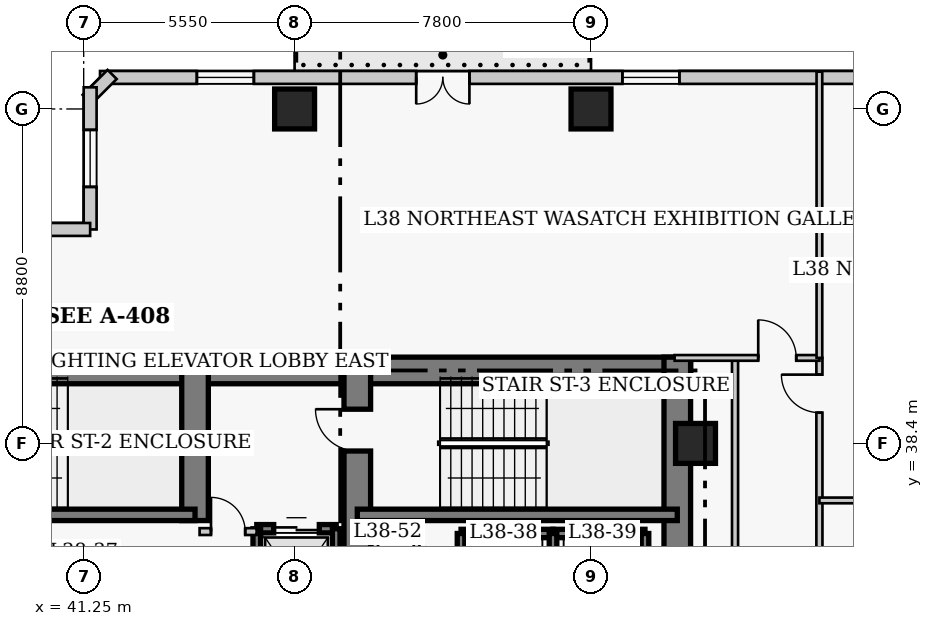
"""IFC4 building model, lengths in metres.
Left out: names, types, materials, properties, quantities, classifications, styles, units other than length and angle.
Written with IfcOpenShell. Run it as: python <this file> out.ifc"""

import sys

from ifc_helpers import new_model, si_unit, direction, frame, frame_2d, origin, origin_2d, place, context, subcontext, project, spatial, rectangle, extrude, element, fill, save


model = new_model("IFC4")
c1 = context("Model", 3, precision=1e-05, world=origin(), true_north=direction((0.0, 1.0)))
c2 = subcontext(c1, "Body", "Model", "MODEL_VIEW")
j1 = project(units=[si_unit("LENGTHUNIT", "METRE"), si_unit("PLANEANGLEUNIT", "RADIAN")], contexts=[c1])
p1 = place(None, origin())
s1 = spatial("IfcSite", under=j1, at=p1, CompositionType="ELEMENT")
p2 = place(p1, origin())
s2 = spatial("IfcBuilding", under=s1, at=p2, CompositionType="ELEMENT")
p3 = place(p2, frame((0.0, 0.0, 153.6)))
s3 = spatial("IfcBuildingStorey", under=s2, at=p3, CompositionType="ELEMENT", Elevation=153.6)
p4 = place(p3, frame((35.85, 40.32, 0.0), z_axis=(0.0, 0.0, 1.0), x_axis=(1.0, 0.0, 0.0)))
e1 = element("IfcWall", 1, at=p4, inside=s3, PredefinedType="SHEAR", context=c2, shape_type="SweptSolid", body=[
    extrude(rectangle(XDim=12.6, YDim=0.7, at=frame_2d((6.3, 0.0))), origin(), (0.0, 0.0, 1.0), 3.8),
])
p5 = place(p3, frame((48.45, 40.32, 0.0), z_axis=(0.0, 0.0, 1.0), x_axis=(1.0, 0.0, 0.0)))
e2 = element("IfcWall", 2, at=p5, inside=s3, PredefinedType="SHEAR", context=c2, shape_type="SweptSolid", body=[
    extrude(rectangle(XDim=8.77, YDim=0.7, at=frame_2d((4.385, 0.0))), origin(), (0.0, 0.0, 1.0), 3.8),
])
p6 = place(p3, frame((56.87, 27.05, 0.0), z_axis=(0.0, 0.0, 1.0), x_axis=(0.0, 1.0, 0.0)))
e3 = element("IfcWall", 3, at=p6, inside=s3, PredefinedType="SHEAR", context=c2, shape_type="SweptSolid", body=[
    extrude(rectangle(XDim=13.62, YDim=0.7, at=frame_2d((6.81, 0.0))), origin(), (0.0, 0.0, 1.0), 3.8),
])
p7 = place(p3, frame((44.18, 36.37, 0.0), z_axis=(0.0, 0.0, 1.0), x_axis=(0.0, 1.0, 0.0)))
e4 = element("IfcWall", 4, at=p7, inside=s3, PredefinedType="SHEAR", context=c2, shape_type="SweptSolid", body=[
    extrude(rectangle(XDim=3.95, YDim=0.7, at=frame_2d((1.975, 0.0))), origin(), (0.0, 0.0, 1.0), 3.8),
])
p8 = place(p3, frame((48.45, 32.4, 0.0), z_axis=(0.0, 0.0, 1.0), x_axis=(0.0, 1.0, 0.0)))
e5 = element("IfcWall", 5, at=p8, inside=s3, PredefinedType="SHEAR", context=c2, shape_type="SweptSolid", body=[
    extrude(rectangle(XDim=7.92, YDim=0.7, at=frame_2d((3.96, 0.0))), origin(), (0.0, 0.0, 1.0), 3.8),
])
p9 = place(p8, frame((5.8, 0.0, 0.0)))
e6 = element("IfcOpeningElement", 6, at=p9, cuts=e5, PredefinedType="OPENING", context=c2, shape_type="SweptSolid", body=[
    extrude(rectangle(XDim=1.1, YDim=2.15, at=frame_2d((0.55, 1.075))), frame((0.0, 0.36, 0.0), z_axis=(0.0, -1.0, 0.0), x_axis=(1.0, 0.0, 0.0)), (0.0, 0.0, 1.0), 0.72),
])
p10 = place(p3, frame((35.85, 36.52, 0.0), z_axis=(0.0, 0.0, 1.0), x_axis=(1.0, 0.0, 0.0)))
e7 = element("IfcWall", 7, at=p10, inside=s3, PredefinedType="SHEAR", context=c2, shape_type="SweptSolid", body=[
    extrude(rectangle(XDim=8.33, YDim=0.3, at=frame_2d((4.165, 0.0))), origin(), (0.0, 0.0, 1.0), 3.8),
])
p11 = place(p3, frame((48.45, 36.52, 0.0), z_axis=(0.0, 0.0, 1.0), x_axis=(1.0, 0.0, 0.0)))
e8 = element("IfcWall", 8, at=p11, inside=s3, PredefinedType="SHEAR", context=c2, shape_type="SweptSolid", body=[
    extrude(rectangle(XDim=8.42, YDim=0.3, at=frame_2d((4.21, 0.0))), origin(), (0.0, 0.0, 1.0), 3.8),
])
for number, where, z_axis, x_axis in (
    (9, (46.8, 47.2, 0.0), (0.0, 0.0, 1.0), (1.0, 0.0, 0.0)),
    (10, (54.6, 47.2, 0.0), (0.0, 0.0, 1.0), (1.0, 0.0, 0.0)),
    (11, (57.35, 38.4, 0.0), (0.0, 0.0, 1.0), (1.0, 0.0, 0.0)),
):
    element("IfcColumn", number, at=place(p3, frame(where, z_axis=z_axis, x_axis=x_axis)), inside=s3, PredefinedType="COLUMN", context=c2, shape_type="SweptSolid", body=[
        extrude(rectangle(XDim=1.05, YDim=1.05, at=origin_2d()), origin(), (0.0, 0.0, 1.0), 3.8),
    ])
p12 = place(p3, frame((68.37, 48.03, 0.0), z_axis=(0.0, 0.0, 1.0), x_axis=(-1.0, 0.0, 0.0)))
e12 = element("IfcWall", 12, at=p12, inside=s3, PredefinedType="SOLIDWALL", context=c2, shape_type="SweptSolid", body=[
    extrude(rectangle(XDim=26.69, YDim=0.34, at=frame_2d((13.345, 0.0))), origin(), (0.0, 0.0, 1.0), 3.55),
])
p13 = place(p12, frame((16.97, 0.0, 0.0)))
e13 = element("IfcOpeningElement", 13, at=p13, cuts=e12, PredefinedType="OPENING", context=c2, shape_type="SweptSolid", body=[
    extrude(rectangle(XDim=1.4, YDim=2.15, at=frame_2d((0.7, 1.075))), frame((0.0, 0.18, 0.0), z_axis=(0.0, -1.0, 0.0), x_axis=(1.0, 0.0, 0.0)), (0.0, 0.0, 1.0), 0.36),
])
p14 = place(p12, frame((3.048, 0.0, 0.85)))
e14 = element("IfcOpeningElement", 14, at=p14, cuts=e12, PredefinedType="OPENING", context=c2, shape_type="SweptSolid", body=[
    extrude(rectangle(XDim=1.5, YDim=1.75, at=frame_2d((0.75, 0.875))), frame((0.0, 0.18, 0.0), z_axis=(0.0, -1.0, 0.0), x_axis=(1.0, 0.0, 0.0)), (0.0, 0.0, 1.0), 0.36),
])
p15 = place(p12, frame((11.445, 0.0, 0.85)))
e15 = element("IfcOpeningElement", 15, at=p15, cuts=e12, PredefinedType="OPENING", context=c2, shape_type="SweptSolid", body=[
    extrude(rectangle(XDim=1.5, YDim=1.75, at=frame_2d((0.75, 0.875))), frame((0.0, 0.18, 0.0), z_axis=(0.0, -1.0, 0.0), x_axis=(1.0, 0.0, 0.0)), (0.0, 0.0, 1.0), 0.36),
])
p16 = place(p12, frame((22.642, 0.0, 0.85)))
e16 = element("IfcOpeningElement", 16, at=p16, cuts=e12, PredefinedType="OPENING", context=c2, shape_type="SweptSolid", body=[
    extrude(rectangle(XDim=1.5, YDim=1.75, at=frame_2d((0.75, 0.875))), frame((0.0, 0.18, 0.0), z_axis=(0.0, -1.0, 0.0), x_axis=(1.0, 0.0, 0.0)), (0.0, 0.0, 1.0), 0.36),
])
p17 = place(p3, frame((41.999, 48.108, 0.0), z_axis=(0.0, 0.0, 1.0), x_axis=(-0.707106781187, -0.707106781187, 0.0)))
e17 = element("IfcWall", 17, at=p17, inside=s3, PredefinedType="SOLIDWALL", context=c2, shape_type="SweptSolid", body=[
    extrude(rectangle(XDim=0.929, YDim=0.34, at=frame_2d((0.464, 0.0))), origin(), (0.0, 0.0, 1.0), 3.55),
])
p18 = place(p3, frame((41.42, 47.77, 0.0), z_axis=(0.0, 0.0, 1.0), x_axis=(0.0, -1.0, 0.0)))
e18 = element("IfcWall", 18, at=p18, inside=s3, PredefinedType="SOLIDWALL", context=c2, shape_type="SweptSolid", body=[
    extrude(rectangle(XDim=3.74, YDim=0.34, at=frame_2d((1.87, 0.0))), origin(), (0.0, 0.0, 1.0), 3.55),
])
p19 = place(p18, frame((1.12, 0.0, 0.85)))
e19 = element("IfcOpeningElement", 19, at=p19, cuts=e18, PredefinedType="OPENING", context=c2, shape_type="SweptSolid", body=[
    extrude(rectangle(XDim=1.5, YDim=1.75, at=frame_2d((0.75, 0.875))), frame((0.0, 0.18, 0.0), z_axis=(0.0, -1.0, 0.0), x_axis=(1.0, 0.0, 0.0)), (0.0, 0.0, 1.0), 0.36),
])
p20 = place(p3, frame((41.42, 44.03, 0.0), z_axis=(0.0, 0.0, 1.0), x_axis=(-1.0, 0.0, 0.0)))
e20 = element("IfcWall", 20, at=p20, inside=s3, PredefinedType="SOLIDWALL", context=c2, shape_type="SweptSolid", body=[
    extrude(rectangle(XDim=4.84, YDim=0.34, at=frame_2d((2.42, 0.0))), origin(), (0.0, 0.0, 1.0), 3.55),
])
p21 = place(p20, frame((1.67, 0.0, 0.85)))
e21 = element("IfcOpeningElement", 21, at=p21, cuts=e20, PredefinedType="OPENING", context=c2, shape_type="SweptSolid", body=[
    extrude(rectangle(XDim=1.5, YDim=1.75, at=frame_2d((0.75, 0.875))), frame((0.0, 0.18, 0.0), z_axis=(0.0, -1.0, 0.0), x_axis=(1.0, 0.0, 0.0)), (0.0, 0.0, 1.0), 0.36),
])
p22 = place(p3, frame((51.18, 36.03, 0.0), z_axis=(0.0, 0.0, 1.0), x_axis=(1.0, 0.0, 0.0)))
e22 = element("IfcWall", 22, at=p22, inside=s3, PredefinedType="SHEAR", context=c2, shape_type="SweptSolid", body=[
    extrude(rectangle(XDim=2.42, YDim=0.22, at=frame_2d((1.21, 0.0))), origin(), (0.0, 0.0, 1.0), 3.8),
])
p23 = place(p3, frame((51.18, 33.17, 0.0), z_axis=(0.0, 0.0, 1.0), x_axis=(0.0, 1.0, 0.0)))
e23 = element("IfcWall", 23, at=p23, inside=s3, PredefinedType="SHEAR", context=c2, shape_type="SweptSolid", body=[
    extrude(rectangle(XDim=2.86, YDim=0.2, at=frame_2d((1.43, 0.0))), origin(), (0.0, 0.0, 1.0), 3.8),
])
p24 = place(p3, frame((53.6, 36.03, 0.0), z_axis=(0.0, 0.0, 1.0), x_axis=(1.0, 0.0, 0.0)))
e24 = element("IfcWall", 24, at=p24, inside=s3, PredefinedType="SHEAR", context=c2, shape_type="SweptSolid", body=[
    extrude(rectangle(XDim=2.42, YDim=0.22, at=frame_2d((1.21, 0.0))), origin(), (0.0, 0.0, 1.0), 3.8),
])
for number, where, z_axis, x_axis in (
    (25, (53.6, 33.17, 0.0), (0.0, 0.0, 1.0), (0.0, 1.0, 0.0)),
    (26, (56.02, 33.17, 0.0), (0.0, 0.0, 1.0), (0.0, 1.0, 0.0)),
):
    element("IfcWall", number, at=place(p3, frame(where, z_axis=z_axis, x_axis=x_axis)), inside=s3, PredefinedType="SHEAR", context=c2, shape_type="SweptSolid", body=[
        extrude(rectangle(XDim=2.86, YDim=0.2, at=frame_2d((1.43, 0.0))), origin(), (0.0, 0.0, 1.0), 3.8),
    ])
p25 = place(p3, frame((45.805, 36.155, 0.0), z_axis=(0.0, 0.0, 1.0), x_axis=(1.0, 0.0, 0.0)))
e27 = element("IfcWall", 27, at=p25, inside=s3, PredefinedType="SHEAR", context=c2, shape_type="SweptSolid", body=[
    extrude(rectangle(XDim=2.09, YDim=0.22, at=frame_2d((1.045, 0.0))), origin(), (0.0, 0.0, 1.0), 3.8),
])
p26 = place(p25, frame((0.445, 0.0, 0.0)))
e28 = element("IfcOpeningElement", 28, at=p26, cuts=e27, PredefinedType="OPENING", context=c2, shape_type="SweptSolid", body=[
    extrude(rectangle(XDim=1.2, YDim=2.15, at=frame_2d((0.6, 1.075))), frame((0.0, 0.12, 0.0), z_axis=(0.0, -1.0, 0.0), x_axis=(1.0, 0.0, 0.0)), (0.0, 0.0, 1.0), 0.24),
])
p27 = place(p3, frame((45.805, 32.65, 0.0), z_axis=(0.0, 0.0, 1.0), x_axis=(0.0, 1.0, 0.0)))
e29 = element("IfcWall", 29, at=p27, inside=s3, PredefinedType="SHEAR", context=c2, shape_type="SweptSolid", body=[
    extrude(rectangle(XDim=3.505, YDim=0.2, at=frame_2d((1.752, 0.0))), origin(), (0.0, 0.0, 1.0), 3.8),
])
p28 = place(p3, frame((47.895, 33.245, 0.0), z_axis=(0.0, 0.0, 1.0), x_axis=(0.0, 1.0, 0.0)))
e30 = element("IfcWall", 30, at=p28, inside=s3, PredefinedType="SHEAR", context=c2, shape_type="SweptSolid", body=[
    extrude(rectangle(XDim=2.91, YDim=0.2, at=frame_2d((1.455, 0.0))), origin(), (0.0, 0.0, 1.0), 3.8),
])
p29 = place(p3, frame((44.3, 36.08, 0.0), z_axis=(0.0, 0.0, 1.0), x_axis=(1.0, 0.0, 0.0)))
e31 = element("IfcWall", 31, at=p29, inside=s3, PredefinedType="PARTITIONING", context=c2, shape_type="SweptSolid", body=[
    extrude(rectangle(XDim=1.5, YDim=0.18, at=frame_2d((0.75, 0.0))), origin(), (0.0, 0.0, 1.0), 3.55),
])
p30 = place(p29, frame((0.3, 0.0, 0.0)))
e32 = element("IfcOpeningElement", 32, at=p30, cuts=e31, PredefinedType="OPENING", context=c2, shape_type="SweptSolid", body=[
    extrude(rectangle(XDim=0.9, YDim=2.15, at=frame_2d((0.45, 1.075))), frame((0.0, 0.1, 0.0), z_axis=(0.0, -1.0, 0.0), x_axis=(1.0, 0.0, 0.0)), (0.0, 0.0, 1.0), 0.2),
])
for number, where, z_axis, x_axis in (
    (33, (48.92, 32.75, 0.0), (0.0, 0.0, 1.0), (0.0, 1.0, 0.0)),
    (34, (50.01, 32.75, 0.0), (0.0, 0.0, 1.0), (0.0, 1.0, 0.0)),
):
    element("IfcWall", number, at=place(p3, frame(where, z_axis=z_axis, x_axis=x_axis)), inside=s3, PredefinedType="PARTITIONING", context=c2, shape_type="SweptSolid", body=[
        extrude(rectangle(XDim=3.62, YDim=0.15, at=frame_2d((1.81, 0.0))), origin(), (0.0, 0.0, 1.0), 3.55),
    ])
p31 = place(p3, frame((60.61, 12.05, 0.0), z_axis=(0.0, 0.0, 1.0), x_axis=(0.0, 1.0, 0.0)))
e35 = element("IfcWall", 35, at=p31, inside=s3, PredefinedType="PARTITIONING", context=c2, shape_type="SweptSolid", body=[
    extrude(rectangle(XDim=28.6, YDim=0.16, at=frame_2d((14.3, 0.0))), origin(), (0.0, 0.0, 1.0), 3.55),
])
p32 = place(p31, frame((3.5, 0.0, 0.0)))
e36 = element("IfcOpeningElement", 36, at=p32, cuts=e35, PredefinedType="OPENING", context=c2, shape_type="SweptSolid", body=[
    extrude(rectangle(XDim=0.95, YDim=2.1, at=frame_2d((0.475, 1.05))), frame((0.0, 0.09, 0.0), z_axis=(0.0, -1.0, 0.0), x_axis=(1.0, 0.0, 0.0)), (0.0, 0.0, 1.0), 0.18),
])
p33 = place(p31, frame((11.875, 0.0, 0.0)))
e37 = element("IfcOpeningElement", 37, at=p33, cuts=e35, PredefinedType="OPENING", context=c2, shape_type="SweptSolid", body=[
    extrude(rectangle(XDim=0.95, YDim=2.1, at=frame_2d((0.475, 1.05))), frame((0.0, 0.09, 0.0), z_axis=(0.0, -1.0, 0.0), x_axis=(1.0, 0.0, 0.0)), (0.0, 0.0, 1.0), 0.18),
])
p34 = place(p31, frame((20.325, 0.0, 0.0)))
e38 = element("IfcOpeningElement", 38, at=p34, cuts=e35, PredefinedType="OPENING", context=c2, shape_type="SweptSolid", body=[
    extrude(rectangle(XDim=0.95, YDim=2.1, at=frame_2d((0.475, 1.05))), frame((0.0, 0.09, 0.0), z_axis=(0.0, -1.0, 0.0), x_axis=(1.0, 0.0, 0.0)), (0.0, 0.0, 1.0), 0.18),
])
p35 = place(p31, frame((27.16, 0.0, 0.0)))
e39 = element("IfcOpeningElement", 39, at=p35, cuts=e35, PredefinedType="OPENING", context=c2, shape_type="SweptSolid", body=[
    extrude(rectangle(XDim=1.0, YDim=2.15, at=frame_2d((0.5, 1.075))), frame((0.0, 0.09, 0.0), z_axis=(0.0, -1.0, 0.0), x_axis=(1.0, 0.0, 0.0)), (0.0, 0.0, 1.0), 0.18),
])
p36 = place(p3, frame((58.39, 16.51, 0.0), z_axis=(0.0, 0.0, 1.0), x_axis=(0.0, 1.0, 0.0)))
e40 = element("IfcWall", 40, at=p36, inside=s3, PredefinedType="PARTITIONING", context=c2, shape_type="SweptSolid", body=[
    extrude(rectangle(XDim=24.14, YDim=0.16, at=frame_2d((12.07, 0.0))), origin(), (0.0, 0.0, 1.0), 3.093),
])
p37 = place(p3, frame((56.8, 40.65, 0.0), z_axis=(0.0, 0.0, 1.0), x_axis=(1.0, 0.0, 0.0)))
e41 = element("IfcWall", 41, at=p37, inside=s3, PredefinedType="PARTITIONING", context=c2, shape_type="SweptSolid", body=[
    extrude(rectangle(XDim=3.81, YDim=0.15, at=frame_2d((1.905, 0.0))), origin(), (0.0, 0.0, 1.0), 3.55),
])
p38 = place(p37, frame((2.2, 0.0, 0.0)))
e42 = element("IfcOpeningElement", 42, at=p38, cuts=e41, PredefinedType="OPENING", context=c2, shape_type="SweptSolid", body=[
    extrude(rectangle(XDim=1.0, YDim=2.15, at=frame_2d((0.5, 1.075))), frame((0.0, 0.085, 0.0), z_axis=(0.0, -1.0, 0.0), x_axis=(1.0, 0.0, 0.0)), (0.0, 0.0, 1.0), 0.17),
])
p39 = place(p3, frame((60.61, 40.65, 0.0), z_axis=(0.0, 0.0, 1.0), x_axis=(0.0, 1.0, 0.0)))
e43 = element("IfcWall", 43, at=p39, inside=s3, PredefinedType="PARTITIONING", context=c2, shape_type="SweptSolid", body=[
    extrude(rectangle(XDim=7.53, YDim=0.15, at=frame_2d((3.765, 0.0))), origin(), (0.0, 0.0, 1.0), 3.55),
])
p40 = place(p3, frame((60.61, 36.9, 0.0), z_axis=(0.0, 0.0, 1.0), x_axis=(1.0, 0.0, 0.0)))
e44 = element("IfcWall", 44, at=p40, inside=s3, PredefinedType="PARTITIONING", context=c2, shape_type="SweptSolid", body=[
    extrude(rectangle(XDim=4.49, YDim=0.15, at=frame_2d((2.245, 0.0))), origin(), (0.0, 0.0, 1.0), 3.55),
])
p41 = place(p13, origin())
e45 = element("IfcDoor", 45, at=p41, inside=s3, OperationType="DOUBLE_DOOR_SINGLE_SWING", PredefinedType="DOOR", context=c2, shape_type="SweptSolid", body=[
    extrude(rectangle(XDim=1.4, YDim=2.15, at=frame_2d((0.7, 1.075))), frame((0.0, 0.025, 0.0), z_axis=(0.0, -1.0, 0.0), x_axis=(1.0, 0.0, 0.0)), (0.0, 0.0, 1.0), 0.05),
])
fill(e13, e45)
p42 = place(p15, origin())
e46 = element("IfcWindow", 46, at=p42, inside=s3, PartitioningType="SINGLE_PANEL", PredefinedType="WINDOW", context=c2, shape_type="SweptSolid", body=[
    extrude(rectangle(XDim=1.5, YDim=1.75, at=frame_2d((0.75, 0.875))), frame((0.0, 0.03, 0.0), z_axis=(0.0, -1.0, 0.0), x_axis=(1.0, 0.0, 0.0)), (0.0, 0.0, 1.0), 0.06),
])
fill(e15, e46)
p43 = place(p16, origin())
e47 = element("IfcWindow", 47, at=p43, inside=s3, PartitioningType="SINGLE_PANEL", PredefinedType="WINDOW", context=c2, shape_type="SweptSolid", body=[
    extrude(rectangle(XDim=1.5, YDim=1.75, at=frame_2d((0.75, 0.875))), frame((0.0, 0.03, 0.0), z_axis=(0.0, -1.0, 0.0), x_axis=(1.0, 0.0, 0.0)), (0.0, 0.0, 1.0), 0.06),
])
fill(e16, e47)
p44 = place(p19, origin())
e48 = element("IfcWindow", 48, at=p44, inside=s3, PartitioningType="SINGLE_PANEL", PredefinedType="WINDOW", context=c2, shape_type="SweptSolid", body=[
    extrude(rectangle(XDim=1.5, YDim=1.75, at=frame_2d((0.75, 0.875))), frame((0.0, 0.03, 0.0), z_axis=(0.0, -1.0, 0.0), x_axis=(1.0, 0.0, 0.0)), (0.0, 0.0, 1.0), 0.06),
])
fill(e19, e48)
p45 = place(p26, origin())
e49 = element("IfcDoor", 49, at=p45, inside=s3, OperationType="DOUBLE_DOOR_SLIDING", PredefinedType="DOOR", context=c2, shape_type="SweptSolid", body=[
    extrude(rectangle(XDim=1.2, YDim=2.15, at=frame_2d((0.6, 1.075))), frame((0.0, 0.025, 0.0), z_axis=(0.0, -1.0, 0.0), x_axis=(1.0, 0.0, 0.0)), (0.0, 0.0, 1.0), 0.05),
])
fill(e28, e49)
p46 = place(p30, origin())
e50 = element("IfcDoor", 50, at=p46, inside=s3, OperationType="SINGLE_SWING_LEFT", PredefinedType="DOOR", context=c2, shape_type="SweptSolid", body=[
    extrude(rectangle(XDim=0.9, YDim=2.15, at=frame_2d((0.45, 1.075))), frame((0.0, 0.025, 0.0), z_axis=(0.0, -1.0, 0.0), x_axis=(1.0, 0.0, 0.0)), (0.0, 0.0, 1.0), 0.05),
])
fill(e32, e50)
p47 = place(p38, origin())
e51 = element("IfcDoor", 51, at=p47, inside=s3, OperationType="SINGLE_SWING_LEFT", PredefinedType="DOOR", context=c2, shape_type="SweptSolid", body=[
    extrude(rectangle(XDim=1.0, YDim=2.15, at=frame_2d((0.5, 1.075))), frame((0.0, 0.025, 0.0), z_axis=(0.0, -1.0, 0.0), x_axis=(1.0, 0.0, 0.0)), (0.0, 0.0, 1.0), 0.05),
])
fill(e42, e51)
p48 = place(p35, origin())
e52 = element("IfcDoor", 52, at=p48, inside=s3, OperationType="SINGLE_SWING_RIGHT", PredefinedType="DOOR", context=c2, shape_type="SweptSolid", body=[
    extrude(rectangle(XDim=1.0, YDim=2.15, at=frame_2d((0.5, 1.075))), frame((0.0, 0.025, 0.0), z_axis=(0.0, -1.0, 0.0), x_axis=(1.0, 0.0, 0.0)), (0.0, 0.0, 1.0), 0.05),
])
fill(e39, e52)
p49 = place(p9, origin())
e53 = element("IfcDoor", 53, at=p49, inside=s3, OperationType="SINGLE_SWING_RIGHT", PredefinedType="DOOR", context=c2, shape_type="SweptSolid", body=[
    extrude(rectangle(XDim=1.1, YDim=2.15, at=frame_2d((0.55, 1.075))), frame((0.0, 0.025, 0.0), z_axis=(0.0, -1.0, 0.0), x_axis=(1.0, 0.0, 0.0)), (0.0, 0.0, 1.0), 0.05),
])
fill(e6, e53)
save(model, sys.argv[1])
